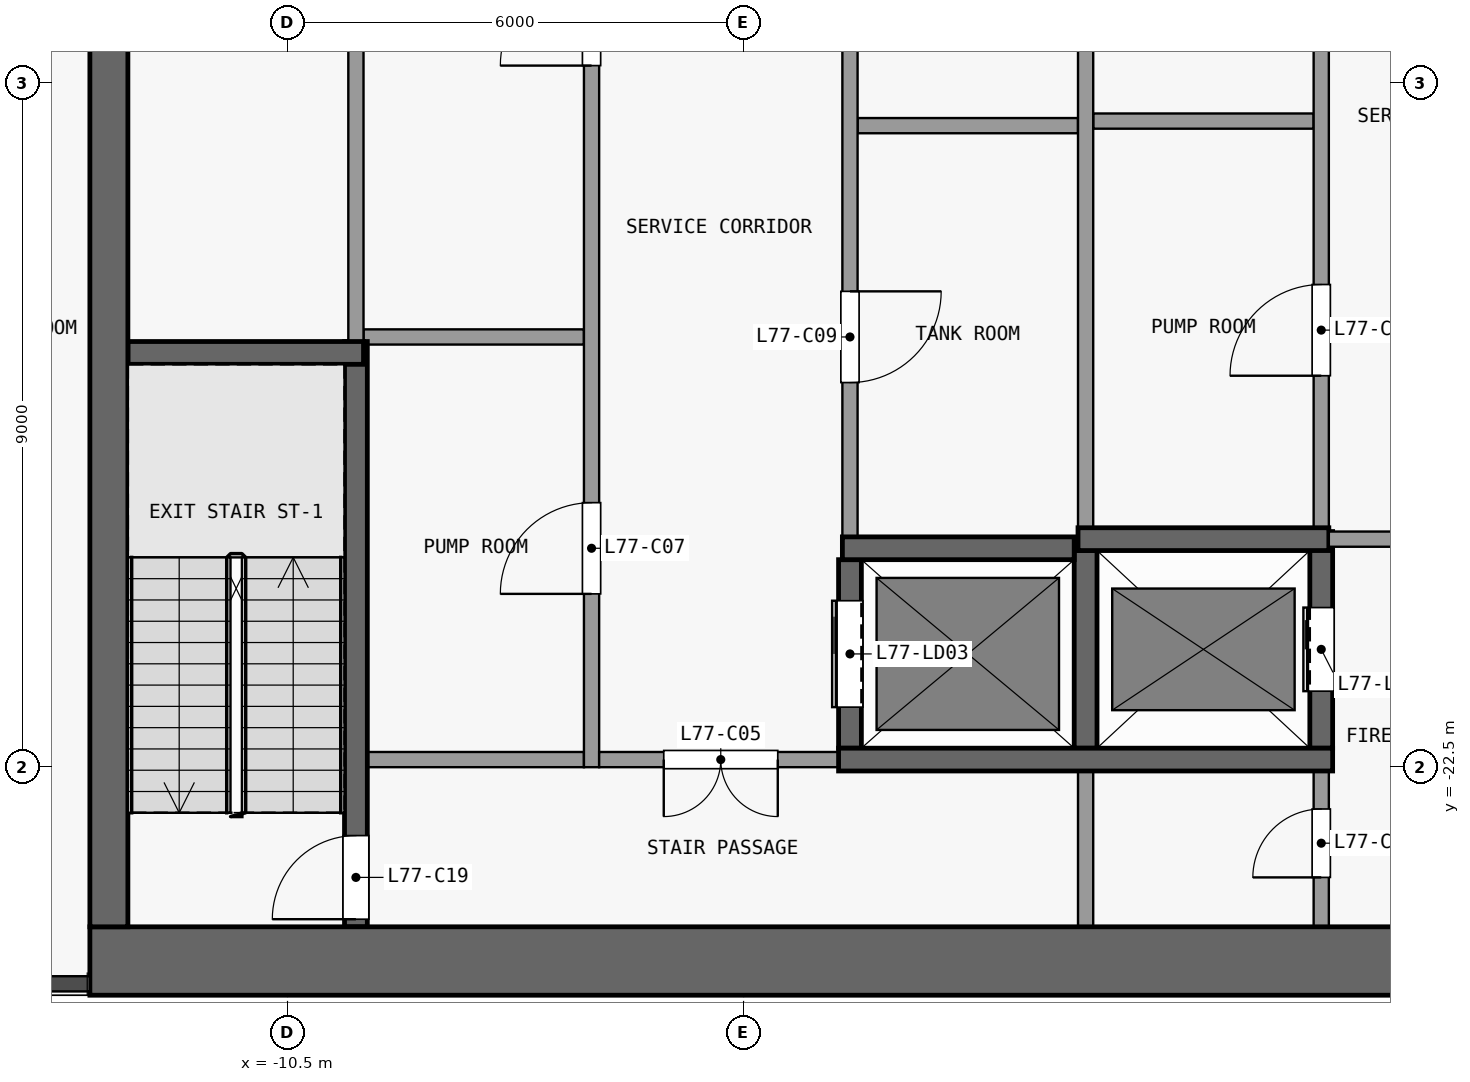
"""IFC4 building model, lengths in metres.
Left out: names, types, materials, properties, quantities, classifications, styles, units other than length and angle.
Written with IfcOpenShell. Run it as: python <this file> out.ifc"""

import sys

from ifc_helpers import new_model, si_unit, direction, frame, frame_2d, origin, place, context, subcontext, project, spatial, rectangle, extrude, element, fill, save


model = new_model("IFC4")
c1 = context("Model", 3, precision=1e-05, world=origin(), true_north=direction((0.0, 1.0)))
c2 = subcontext(c1, "Body", "Model", "MODEL_VIEW")
j1 = project(units=[si_unit("LENGTHUNIT", "METRE"), si_unit("PLANEANGLEUNIT", "RADIAN")], contexts=[c1])
p1 = place(None, origin())
s1 = spatial("IfcSite", under=j1, at=p1, CompositionType="ELEMENT")
p2 = place(p1, origin())
s2 = spatial("IfcBuilding", under=s1, at=p2, CompositionType="ELEMENT")
p3 = place(p2, frame((0.0, 0.0, 303.2)))
s3 = spatial("IfcBuildingStorey", under=s2, at=p3, CompositionType="ELEMENT", Elevation=303.2)
p4 = place(p3, frame((-13.1, -25.05, 0.0), z_axis=(0.0, 0.0, 1.0), x_axis=(1.0, 0.0, 0.0)))
e1 = element("IfcWall", 1, at=p4, inside=s3, PredefinedType="SHEAR", context=c2, shape_type="SweptSolid", body=[
    extrude(rectangle(XDim=26.2, YDim=0.9, at=frame_2d((13.1, 0.0))), origin(), (0.0, 0.0, 1.0), 4.2),
])
p5 = place(p3, frame((-12.85, -24.6, 0.0), z_axis=(0.0, 0.0, 1.0), x_axis=(0.0, 1.0, 0.0)))
e2 = element("IfcWall", 2, at=p5, inside=s3, PredefinedType="SHEAR", context=c2, shape_type="SweptSolid", body=[
    extrude(rectangle(XDim=16.1, YDim=0.5, at=frame_2d((8.05, 0.0))), origin(), (0.0, 0.0, 1.0), 4.2),
])
p6 = place(p3, frame((-9.45, -22.4, 0.0), z_axis=(0.0, 0.0, 1.0), x_axis=(1.0, 0.0, 0.0)))
e3 = element("IfcWall", 3, at=p6, inside=s3, PredefinedType="PARTITIONING", context=c2, shape_type="SweptSolid", body=[
    extrude(rectangle(XDim=2.85, YDim=0.2, at=frame_2d((1.425, 0.0))), origin(), (0.0, 0.0, 1.0), 4.2),
])
p7 = place(p3, frame((-3.25, -22.4, 0.0), z_axis=(0.0, 0.0, 1.0), x_axis=(-1.0, 0.0, 0.0)))
e4 = element("IfcWall", 4, at=p7, inside=s3, PredefinedType="PARTITIONING", context=c2, shape_type="SweptSolid", body=[
    extrude(rectangle(XDim=3.15, YDim=0.2, at=frame_2d((1.575, 0.0))), origin(), (0.0, 0.0, 1.0), 4.2),
])
p8 = place(p7, frame((0.8, 0.0, 0.0)))
e5 = element("IfcOpeningElement", 5, at=p8, cuts=e4, PredefinedType="OPENING", context=c2, shape_type="SweptSolid", body=[
    extrude(rectangle(XDim=1.5, YDim=2.1, at=frame_2d((0.75, 1.05))), frame((0.0, 0.11, 0.0), z_axis=(0.0, -1.0, 0.0), x_axis=(1.0, 0.0, 0.0)), (0.0, 0.0, 1.0), 0.22),
])
p9 = place(p3, frame((-3.25, -22.4, 0.0), z_axis=(0.0, 0.0, 1.0), x_axis=(1.0, 0.0, 0.0)))
e6 = element("IfcWall", 6, at=p9, inside=s3, PredefinedType="SHEAR", context=c2, shape_type="SweptSolid", body=[
    extrude(rectangle(XDim=6.5, YDim=0.3, at=frame_2d((3.25, 0.0))), origin(), (0.0, 0.0, 1.0), 4.2),
])
p10 = place(p3, frame((-3.2, -19.62, 0.0), z_axis=(0.0, 0.0, 1.0), x_axis=(1.0, 0.0, 0.0)))
e7 = element("IfcWall", 7, at=p10, inside=s3, PredefinedType="SHEAR", context=c2, shape_type="SweptSolid", body=[
    extrude(rectangle(XDim=3.05, YDim=0.3, at=frame_2d((1.525, 0.0))), origin(), (0.0, 0.0, 1.0), 4.2),
])
p11 = place(p3, frame((-0.1, -19.5, 0.0), z_axis=(0.0, 0.0, 1.0), x_axis=(1.0, 0.0, 0.0)))
e8 = element("IfcWall", 8, at=p11, inside=s3, PredefinedType="SHEAR", context=c2, shape_type="SweptSolid", body=[
    extrude(rectangle(XDim=3.3, YDim=0.3, at=frame_2d((1.65, 0.0))), origin(), (0.0, 0.0, 1.0), 4.2),
])
p12 = place(p3, frame((6.4, -19.5, 0.0), z_axis=(0.0, 0.0, 1.0), x_axis=(-1.0, 0.0, 0.0)))
e9 = element("IfcWall", 9, at=p12, inside=s3, PredefinedType="PARTITIONING", context=c2, shape_type="SweptSolid", body=[
    extrude(rectangle(XDim=3.2, YDim=0.2, at=frame_2d((1.6, 0.0))), origin(), (0.0, 0.0, 1.0), 4.2),
])
p13 = place(p12, frame((0.85, 0.0, 0.0)))
e10 = element("IfcOpeningElement", 10, at=p13, cuts=e9, PredefinedType="OPENING", context=c2, shape_type="SweptSolid", body=[
    extrude(rectangle(XDim=1.5, YDim=2.1, at=frame_2d((0.75, 1.05))), frame((0.0, 0.11, 0.0), z_axis=(0.0, -1.0, 0.0), x_axis=(1.0, 0.0, 0.0)), (0.0, 0.0, 1.0), 0.22),
])
p14 = place(p3, frame((-12.6, -17.05, 0.0), z_axis=(0.0, 0.0, 1.0), x_axis=(1.0, 0.0, 0.0)))
e11 = element("IfcWall", 11, at=p14, inside=s3, PredefinedType="SHEAR", context=c2, shape_type="SweptSolid", body=[
    extrude(rectangle(XDim=3.1, YDim=0.3, at=frame_2d((1.55, 0.0))), origin(), (0.0, 0.0, 1.0), 4.2),
])
for number, where, z_axis, x_axis in (
    (12, (-9.5, -16.84, 0.0), (0.0, 0.0, 1.0), (1.0, 0.0, 0.0)),
    (13, (-3.0, -14.06, 0.0), (0.0, 0.0, 1.0), (1.0, 0.0, 0.0)),
    (14, (0.1, -14.0, 0.0), (0.0, 0.0, 1.0), (1.0, 0.0, 0.0)),
):
    element("IfcWall", number, at=place(p3, frame(where, z_axis=z_axis, x_axis=x_axis)), inside=s3, PredefinedType="PARTITIONING", context=c2, shape_type="SweptSolid", body=[
        extrude(rectangle(XDim=2.9, YDim=0.2, at=frame_2d((1.45, 0.0))), origin(), (0.0, 0.0, 1.0), 4.2),
    ])
p15 = place(p3, frame((-9.6, -24.6, 0.0), z_axis=(0.0, 0.0, 1.0), x_axis=(0.0, 1.0, 0.0)))
e15 = element("IfcWall", 15, at=p15, inside=s3, PredefinedType="SHEAR", context=c2, shape_type="SweptSolid", body=[
    extrude(rectangle(XDim=7.7, YDim=0.3, at=frame_2d((3.85, 0.0))), origin(), (0.0, 0.0, 1.0), 4.2),
])
p16 = place(p15, frame((0.1, 0.0, 0.0)))
e16 = element("IfcOpeningElement", 16, at=p16, cuts=e15, PredefinedType="OPENING", context=c2, shape_type="SweptSolid", body=[
    extrude(rectangle(XDim=1.1, YDim=2.1, at=frame_2d((0.55, 1.05))), frame((0.0, 0.16, 0.0), z_axis=(0.0, -1.0, 0.0), x_axis=(1.0, 0.0, 0.0)), (0.0, 0.0, 1.0), 0.32),
])
p17 = place(p3, frame((-9.6, -16.9, 0.0), z_axis=(0.0, 0.0, 1.0), x_axis=(0.0, 1.0, 0.0)))
e17 = element("IfcWall", 17, at=p17, inside=s3, PredefinedType="PARTITIONING", context=c2, shape_type="SweptSolid", body=[
    extrude(rectangle(XDim=8.4, YDim=0.2, at=frame_2d((4.2, 0.0))), origin(), (0.0, 0.0, 1.0), 4.2),
])
p18 = place(p3, frame((-6.5, -22.5, 0.0), z_axis=(0.0, 0.0, 1.0), x_axis=(0.0, 1.0, 0.0)))
e18 = element("IfcWall", 18, at=p18, inside=s3, PredefinedType="PARTITIONING", context=c2, shape_type="SweptSolid", body=[
    extrude(rectangle(XDim=14.0, YDim=0.2, at=frame_2d((7.0, 0.0))), origin(), (0.0, 0.0, 1.0), 4.2),
])
p19 = place(p18, frame((2.28, 0.0, 0.0)))
e19 = element("IfcOpeningElement", 19, at=p19, cuts=e18, PredefinedType="OPENING", context=c2, shape_type="SweptSolid", body=[
    extrude(rectangle(XDim=1.2, YDim=2.1, at=frame_2d((0.6, 1.05))), frame((0.0, 0.11, 0.0), z_axis=(0.0, -1.0, 0.0), x_axis=(1.0, 0.0, 0.0)), (0.0, 0.0, 1.0), 0.22),
])
p20 = place(p18, frame((9.23, 0.0, 0.0)))
e20 = element("IfcOpeningElement", 20, at=p20, cuts=e18, PredefinedType="OPENING", context=c2, shape_type="SweptSolid", body=[
    extrude(rectangle(XDim=1.2, YDim=2.1, at=frame_2d((0.6, 1.05))), frame((0.0, 0.11, 0.0), z_axis=(0.0, -1.0, 0.0), x_axis=(1.0, 0.0, 0.0)), (0.0, 0.0, 1.0), 0.22),
])
p21 = place(p3, frame((-3.1, -22.25, 0.0), z_axis=(0.0, 0.0, 1.0), x_axis=(0.0, 1.0, 0.0)))
e21 = element("IfcWall", 21, at=p21, inside=s3, PredefinedType="SHEAR", context=c2, shape_type="SweptSolid", body=[
    extrude(rectangle(XDim=2.48, YDim=0.3, at=frame_2d((1.24, 0.0))), origin(), (0.0, 0.0, 1.0), 4.2),
])
p22 = place(p21, frame((0.54, 0.0, 0.0)))
e22 = element("IfcOpeningElement", 22, at=p22, cuts=e21, PredefinedType="OPENING", context=c2, shape_type="SweptSolid", body=[
    extrude(rectangle(XDim=1.4, YDim=2.1, at=frame_2d((0.7, 1.05))), frame((0.0, 0.16, 0.0), z_axis=(0.0, -1.0, 0.0), x_axis=(1.0, 0.0, 0.0)), (0.0, 0.0, 1.0), 0.32),
])
p23 = place(p3, frame((-3.1, -8.5, 0.0), z_axis=(0.0, 0.0, 1.0), x_axis=(0.0, -1.0, 0.0)))
e23 = element("IfcWall", 23, at=p23, inside=s3, PredefinedType="PARTITIONING", context=c2, shape_type="SweptSolid", body=[
    extrude(rectangle(XDim=10.97, YDim=0.2, at=frame_2d((5.485, 0.0))), origin(), (0.0, 0.0, 1.0), 4.2),
])
p24 = place(p23, frame((7.74, 0.0, 0.0)))
e24 = element("IfcOpeningElement", 24, at=p24, cuts=e23, PredefinedType="OPENING", context=c2, shape_type="SweptSolid", body=[
    extrude(rectangle(XDim=1.2, YDim=2.1, at=frame_2d((0.6, 1.05))), frame((0.0, 0.11, 0.0), z_axis=(0.0, -1.0, 0.0), x_axis=(1.0, 0.0, 0.0)), (0.0, 0.0, 1.0), 0.22),
])
p25 = place(p23, frame((2.18, 0.0, 0.0)))
e25 = element("IfcOpeningElement", 25, at=p25, cuts=e23, PredefinedType="OPENING", context=c2, shape_type="SweptSolid", body=[
    extrude(rectangle(XDim=1.2, YDim=2.1, at=frame_2d((0.6, 1.05))), frame((0.0, 0.11, 0.0), z_axis=(0.0, -1.0, 0.0), x_axis=(1.0, 0.0, 0.0)), (0.0, 0.0, 1.0), 0.22),
])
p26 = place(p3, frame((0.0, -24.6, 0.0), z_axis=(0.0, 0.0, 1.0), x_axis=(0.0, 1.0, 0.0)))
e26 = element("IfcWall", 26, at=p26, inside=s3, PredefinedType="PARTITIONING", context=c2, shape_type="SweptSolid", body=[
    extrude(rectangle(XDim=2.05, YDim=0.2, at=frame_2d((1.025, 0.0))), origin(), (0.0, 0.0, 1.0), 4.2),
])
p27 = place(p3, frame((0.0, -22.25, 0.0), z_axis=(0.0, 0.0, 1.0), x_axis=(0.0, 1.0, 0.0)))
e27 = element("IfcWall", 27, at=p27, inside=s3, PredefinedType="SHEAR", context=c2, shape_type="SweptSolid", body=[
    extrude(rectangle(XDim=2.6, YDim=0.3, at=frame_2d((1.3, 0.0))), origin(), (0.0, 0.0, 1.0), 4.2),
])
p28 = place(p3, frame((0.0, -19.35, 0.0), z_axis=(0.0, 0.0, 1.0), x_axis=(0.0, 1.0, 0.0)))
e28 = element("IfcWall", 28, at=p28, inside=s3, PredefinedType="PARTITIONING", context=c2, shape_type="SweptSolid", body=[
    extrude(rectangle(XDim=10.85, YDim=0.2, at=frame_2d((5.425, 0.0))), origin(), (0.0, 0.0, 1.0), 4.2),
])
p29 = place(p3, frame((3.1, -24.6, 0.0), z_axis=(0.0, 0.0, 1.0), x_axis=(0.0, 1.0, 0.0)))
e29 = element("IfcWall", 29, at=p29, inside=s3, PredefinedType="PARTITIONING", context=c2, shape_type="SweptSolid", body=[
    extrude(rectangle(XDim=2.05, YDim=0.2, at=frame_2d((1.025, 0.0))), origin(), (0.0, 0.0, 1.0), 4.2),
])
p30 = place(p29, frame((0.65, 0.0, 0.0)))
e30 = element("IfcOpeningElement", 30, at=p30, cuts=e29, PredefinedType="OPENING", context=c2, shape_type="SweptSolid", body=[
    extrude(rectangle(XDim=0.9, YDim=2.1, at=frame_2d((0.45, 1.05))), frame((0.0, 0.11, 0.0), z_axis=(0.0, -1.0, 0.0), x_axis=(1.0, 0.0, 0.0)), (0.0, 0.0, 1.0), 0.22),
])
p31 = place(p3, frame((3.1, -22.25, 0.0), z_axis=(0.0, 0.0, 1.0), x_axis=(0.0, 1.0, 0.0)))
e31 = element("IfcWall", 31, at=p31, inside=s3, PredefinedType="SHEAR", context=c2, shape_type="SweptSolid", body=[
    extrude(rectangle(XDim=2.85, YDim=0.3, at=frame_2d((1.425, 0.0))), origin(), (0.0, 0.0, 1.0), 4.2),
])
p32 = place(p31, frame((0.75, 0.0, 0.0)))
e32 = element("IfcOpeningElement", 32, at=p32, cuts=e31, PredefinedType="OPENING", context=c2, shape_type="SweptSolid", body=[
    extrude(rectangle(XDim=1.1, YDim=2.1, at=frame_2d((0.55, 1.05))), frame((0.0, 0.16, 0.0), z_axis=(0.0, -1.0, 0.0), x_axis=(1.0, 0.0, 0.0)), (0.0, 0.0, 1.0), 0.32),
])
p33 = place(p3, frame((3.1, -19.6, 0.0), z_axis=(0.0, 0.0, 1.0), x_axis=(0.0, 1.0, 0.0)))
e33 = element("IfcWall", 33, at=p33, inside=s3, PredefinedType="PARTITIONING", context=c2, shape_type="SweptSolid", body=[
    extrude(rectangle(XDim=11.1, YDim=0.2, at=frame_2d((5.55, 0.0))), origin(), (0.0, 0.0, 1.0), 4.2),
])
p34 = place(p33, frame((2.25, 0.0, 0.0)))
e34 = element("IfcOpeningElement", 34, at=p34, cuts=e33, PredefinedType="OPENING", context=c2, shape_type="SweptSolid", body=[
    extrude(rectangle(XDim=1.2, YDim=2.1, at=frame_2d((0.6, 1.05))), frame((0.0, 0.11, 0.0), z_axis=(0.0, -1.0, 0.0), x_axis=(1.0, 0.0, 0.0)), (0.0, 0.0, 1.0), 0.22),
])
p35 = place(p33, frame((7.75, 0.0, 0.0)))
e35 = element("IfcOpeningElement", 35, at=p35, cuts=e33, PredefinedType="OPENING", context=c2, shape_type="SweptSolid", body=[
    extrude(rectangle(XDim=1.2, YDim=2.1, at=frame_2d((0.6, 1.05))), frame((0.0, 0.11, 0.0), z_axis=(0.0, -1.0, 0.0), x_axis=(1.0, 0.0, 0.0)), (0.0, 0.0, 1.0), 0.22),
])
p36 = place(p32, origin())
e36 = element("IfcDoor", 36, at=p36, inside=s3, OperationType="DOUBLE_DOOR_SLIDING", PredefinedType="DOOR", context=c2, shape_type="SweptSolid", body=[
    extrude(rectangle(XDim=1.1, YDim=2.1, at=frame_2d((0.55, 1.05))), frame((0.0, 0.025, 0.0), z_axis=(0.0, -1.0, 0.0), x_axis=(1.0, 0.0, 0.0)), (0.0, 0.0, 1.0), 0.05),
])
fill(e32, e36)
p37 = place(p22, origin())
e37 = element("IfcDoor", 37, at=p37, inside=s3, OperationType="DOUBLE_DOOR_SLIDING", PredefinedType="DOOR", context=c2, shape_type="SweptSolid", body=[
    extrude(rectangle(XDim=1.4, YDim=2.1, at=frame_2d((0.7, 1.05))), frame((0.0, 0.025, 0.0), z_axis=(0.0, -1.0, 0.0), x_axis=(1.0, 0.0, 0.0)), (0.0, 0.0, 1.0), 0.05),
])
fill(e22, e37)
p38 = place(p8, origin())
e38 = element("IfcDoor", 38, at=p38, inside=s3, OperationType="DOUBLE_DOOR_SINGLE_SWING", PredefinedType="DOOR", context=c2, shape_type="SweptSolid", body=[
    extrude(rectangle(XDim=1.5, YDim=2.1, at=frame_2d((0.75, 1.05))), frame((0.0, 0.025, 0.0), z_axis=(0.0, -1.0, 0.0), x_axis=(1.0, 0.0, 0.0)), (0.0, 0.0, 1.0), 0.05),
])
fill(e5, e38)
p39 = place(p19, origin())
e39 = element("IfcDoor", 39, at=p39, inside=s3, OperationType="SINGLE_SWING_LEFT", PredefinedType="DOOR", context=c2, shape_type="SweptSolid", body=[
    extrude(rectangle(XDim=1.2, YDim=2.1, at=frame_2d((0.6, 1.05))), frame((0.0, 0.025, 0.0), z_axis=(0.0, -1.0, 0.0), x_axis=(1.0, 0.0, 0.0)), (0.0, 0.0, 1.0), 0.05),
])
fill(e19, e39)
p40 = place(p20, origin())
e40 = element("IfcDoor", 40, at=p40, inside=s3, OperationType="SINGLE_SWING_LEFT", PredefinedType="DOOR", context=c2, shape_type="SweptSolid", body=[
    extrude(rectangle(XDim=1.2, YDim=2.1, at=frame_2d((0.6, 1.05))), frame((0.0, 0.025, 0.0), z_axis=(0.0, -1.0, 0.0), x_axis=(1.0, 0.0, 0.0)), (0.0, 0.0, 1.0), 0.05),
])
fill(e20, e40)
p41 = place(p24, origin())
e41 = element("IfcDoor", 41, at=p41, inside=s3, OperationType="SINGLE_SWING_LEFT", PredefinedType="DOOR", context=c2, shape_type="SweptSolid", body=[
    extrude(rectangle(XDim=1.2, YDim=2.1, at=frame_2d((0.6, 1.05))), frame((0.0, 0.025, 0.0), z_axis=(0.0, -1.0, 0.0), x_axis=(1.0, 0.0, 0.0)), (0.0, 0.0, 1.0), 0.05),
])
fill(e24, e41)
p42 = place(p34, origin())
e42 = element("IfcDoor", 42, at=p42, inside=s3, OperationType="SINGLE_SWING_LEFT", PredefinedType="DOOR", context=c2, shape_type="SweptSolid", body=[
    extrude(rectangle(XDim=1.2, YDim=2.1, at=frame_2d((0.6, 1.05))), frame((0.0, 0.025, 0.0), z_axis=(0.0, -1.0, 0.0), x_axis=(1.0, 0.0, 0.0)), (0.0, 0.0, 1.0), 0.05),
])
fill(e34, e42)
p43 = place(p30, origin())
e43 = element("IfcDoor", 43, at=p43, inside=s3, OperationType="SINGLE_SWING_LEFT", PredefinedType="DOOR", context=c2, shape_type="SweptSolid", body=[
    extrude(rectangle(XDim=0.9, YDim=2.1, at=frame_2d((0.45, 1.05))), frame((0.0, 0.025, 0.0), z_axis=(0.0, -1.0, 0.0), x_axis=(1.0, 0.0, 0.0)), (0.0, 0.0, 1.0), 0.05),
])
fill(e30, e43)
p44 = place(p16, origin())
e44 = element("IfcDoor", 44, at=p44, inside=s3, OperationType="SINGLE_SWING_LEFT", PredefinedType="DOOR", context=c2, shape_type="SweptSolid", body=[
    extrude(rectangle(XDim=1.1, YDim=2.1, at=frame_2d((0.55, 1.05))), frame((0.0, 0.025, 0.0), z_axis=(0.0, -1.0, 0.0), x_axis=(1.0, 0.0, 0.0)), (0.0, 0.0, 1.0), 0.05),
])
fill(e16, e44)
save(model, sys.argv[1])
